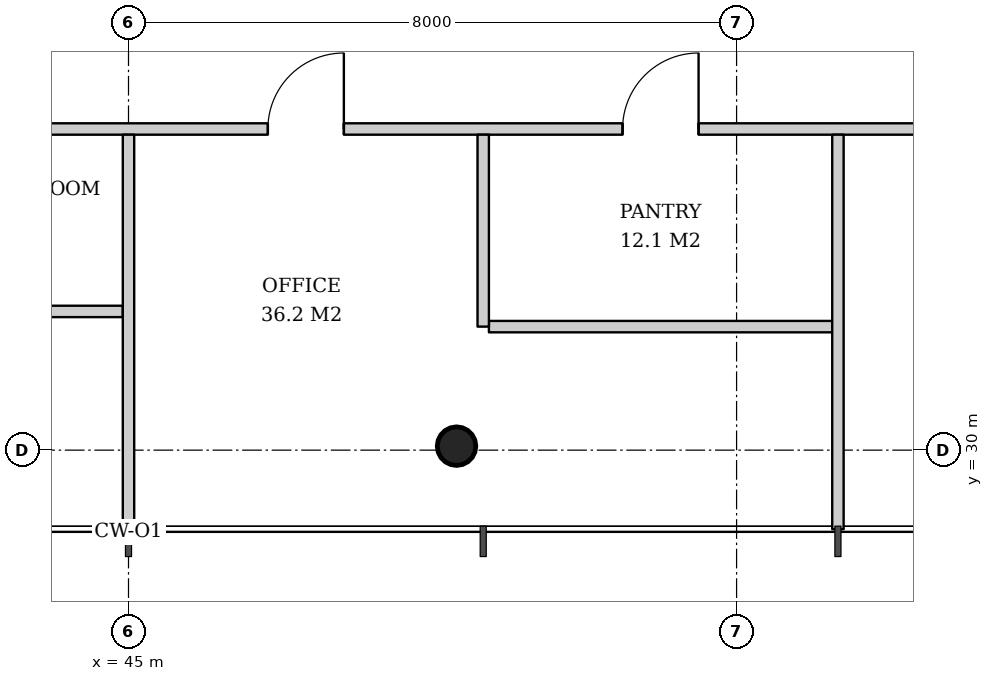
"""IFC4 building model, lengths in metres.
Left out: names, types, materials, properties, quantities, classifications, styles, units other than length and angle.
Written with IfcOpenShell. Run it as: python <this file> out.ifc"""

import sys

from ifc_helpers import new_model, si_unit, direction, frame, frame_2d, origin, origin_2d, place, context, subcontext, project, spatial, rectangle, hollow_circle, extrude, element, fill, save


model = new_model("IFC4")
c1 = context("Model", 3, precision=1e-05, world=origin(), true_north=direction((0.0, 1.0)))
c2 = subcontext(c1, "Body", "Model", "MODEL_VIEW")
j1 = project(units=[si_unit("LENGTHUNIT", "METRE"), si_unit("PLANEANGLEUNIT", "RADIAN")], contexts=[c1])
p1 = place(None, origin())
s1 = spatial("IfcSite", under=j1, at=p1, CompositionType="ELEMENT")
p2 = place(p1, origin())
s2 = spatial("IfcBuilding", under=s1, at=p2, CompositionType="ELEMENT")
p3 = place(p2, frame((0.0, 0.0, 271.8)))
s3 = spatial("IfcBuildingStorey", under=s2, at=p3, CompositionType="ELEMENT", Elevation=271.8)
p4 = place(p3, frame((49.329, 30.014, 0.0), z_axis=(-0.010658915229, 0.031912535354, 0.999433828532), x_axis=(-0.948492281772, -0.316800238982, 0.0)))
e1 = element("IfcColumn", 1, at=p4, inside=s3, PredefinedType="COLUMN", context=c2, shape_type="SweptSolid", body=[
    extrude(hollow_circle(Radius=0.254, WallThickness=0.02, at=origin_2d()), origin(), (0.0, 0.0, 1.0), 3.802),
])
for number, where, z_axis, x_axis in (
    (2, (40.408, 31.825, 0.0), (0.0, 0.0, 1.0), (1.0, 0.0, 0.0)),
    (3, (49.742, 31.625, 0.0), (0.0, 0.0, 1.0), (1.0, 0.0, 0.0)),
):
    element("IfcWall", number, at=place(p3, frame(where, z_axis=z_axis, x_axis=x_axis)), inside=s3, PredefinedType="PARTITIONING", context=c2, shape_type="SweptSolid", body=[
        extrude(rectangle(XDim=4.517, YDim=0.15, at=frame_2d((2.258, 0.0))), origin(), (0.0, 0.0, 1.0), 3.12),
    ])
p5 = place(p3, frame((34.084, 34.225, 0.0), z_axis=(0.0, 0.0, 1.0), x_axis=(1.0, 0.0, 0.0)))
e4 = element("IfcWall", 4, at=p5, inside=s3, PredefinedType="PARTITIONING", context=c2, shape_type="SweptSolid", body=[
    extrude(rectangle(XDim=21.832, YDim=0.15, at=frame_2d((10.916, 0.0))), origin(), (0.0, 0.0, 1.0), 3.02),
])
p6 = place(p5, frame((3.416, 0.0, 0.0)))
e5 = element("IfcOpeningElement", 5, at=p6, cuts=e4, PredefinedType="OPENING", context=c2, shape_type="SweptSolid", body=[
    extrude(rectangle(XDim=1.0, YDim=2.1, at=frame_2d((0.5, 1.05))), frame((0.0, 0.085, 0.0), z_axis=(0.0, -1.0, 0.0), x_axis=(1.0, 0.0, 0.0)), (0.0, 0.0, 1.0), 0.17),
])
p7 = place(p5, frame((8.083, 0.0, 0.0)))
e6 = element("IfcOpeningElement", 6, at=p7, cuts=e4, PredefinedType="OPENING", context=c2, shape_type="SweptSolid", body=[
    extrude(rectangle(XDim=1.0, YDim=2.1, at=frame_2d((0.5, 1.05))), frame((0.0, 0.085, 0.0), z_axis=(0.0, -1.0, 0.0), x_axis=(1.0, 0.0, 0.0)), (0.0, 0.0, 1.0), 0.17),
])
p8 = place(p5, frame((12.749, 0.0, 0.0)))
e7 = element("IfcOpeningElement", 7, at=p8, cuts=e4, PredefinedType="OPENING", context=c2, shape_type="SweptSolid", body=[
    extrude(rectangle(XDim=1.0, YDim=2.1, at=frame_2d((0.5, 1.05))), frame((0.0, 0.085, 0.0), z_axis=(0.0, -1.0, 0.0), x_axis=(1.0, 0.0, 0.0)), (0.0, 0.0, 1.0), 0.17),
])
p9 = place(p5, frame((17.416, 0.0, 0.0)))
e8 = element("IfcOpeningElement", 8, at=p9, cuts=e4, PredefinedType="OPENING", context=c2, shape_type="SweptSolid", body=[
    extrude(rectangle(XDim=1.0, YDim=2.1, at=frame_2d((0.5, 1.05))), frame((0.0, 0.085, 0.0), z_axis=(0.0, -1.0, 0.0), x_axis=(1.0, 0.0, 0.0)), (0.0, 0.0, 1.0), 0.17),
])
p10 = place(p3, frame((45.0, 34.15, 0.0), z_axis=(0.0, 0.0, 1.0), x_axis=(0.0, -1.0, 0.0)))
e9 = element("IfcWall", 9, at=p10, inside=s3, PredefinedType="PARTITIONING", context=c2, shape_type="SweptSolid", body=[
    extrude(rectangle(XDim=5.19, YDim=0.15, at=frame_2d((2.595, 0.0))), origin(), (0.0, 0.0, 1.0), 3.12),
])
p11 = place(p3, frame((49.667, 34.15, 0.0), z_axis=(0.0, 0.0, 1.0), x_axis=(0.0, -1.0, 0.0)))
e10 = element("IfcWall", 10, at=p11, inside=s3, PredefinedType="PARTITIONING", context=c2, shape_type="SweptSolid", body=[
    extrude(rectangle(XDim=2.525, YDim=0.15, at=frame_2d((1.262, 0.0))), origin(), (0.0, 0.0, 1.0), 3.62),
])
p12 = place(p3, frame((54.333, 34.15, 0.0), z_axis=(0.0, 0.0, 1.0), x_axis=(0.0, -1.0, 0.0)))
e11 = element("IfcWall", 11, at=p12, inside=s3, PredefinedType="PARTITIONING", context=c2, shape_type="SweptSolid", body=[
    extrude(rectangle(XDim=5.19, YDim=0.15, at=frame_2d((2.595, 0.0))), origin(), (0.0, 0.0, 1.0), 3.12),
])
p13 = place(p8, origin())
e12 = element("IfcDoor", 12, at=p13, inside=s3, OperationType="SINGLE_SWING_RIGHT", PredefinedType="DOOR", context=c2, shape_type="SweptSolid", body=[
    extrude(rectangle(XDim=1.0, YDim=2.1, at=frame_2d((0.5, 1.05))), frame((0.0, 0.025, 0.0), z_axis=(0.0, -1.0, 0.0), x_axis=(1.0, 0.0, 0.0)), (0.0, 0.0, 1.0), 0.05),
])
fill(e7, e12)
p14 = place(p9, origin())
e13 = element("IfcDoor", 13, at=p14, inside=s3, OperationType="SINGLE_SWING_RIGHT", PredefinedType="DOOR", context=c2, shape_type="SweptSolid", body=[
    extrude(rectangle(XDim=1.0, YDim=2.1, at=frame_2d((0.5, 1.05))), frame((0.0, 0.025, 0.0), z_axis=(0.0, -1.0, 0.0), x_axis=(1.0, 0.0, 0.0)), (0.0, 0.0, 1.0), 0.05),
])
fill(e8, e13)
save(model, sys.argv[1])
